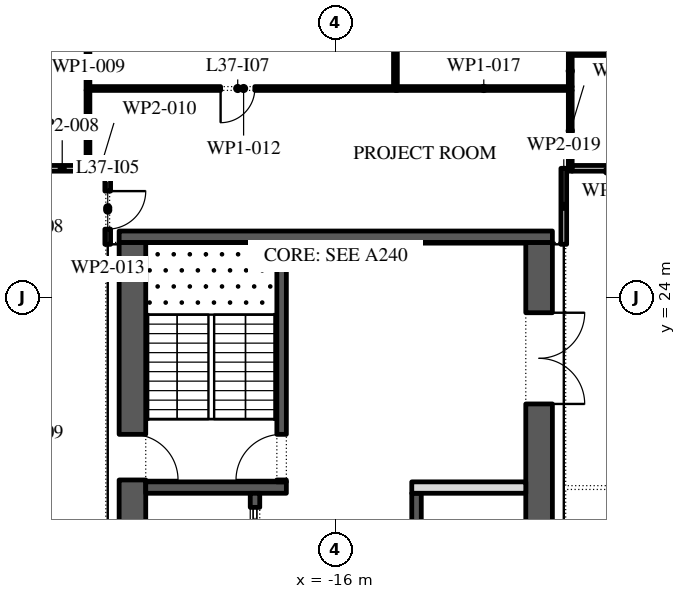
"""IFC4 building model, lengths in metres.
Left out: names, types, materials, properties, quantities, classifications, styles, units other than length and angle.
Written with IfcOpenShell. Run it as: python <this file> out.ifc"""

import sys

from ifc_helpers import new_model, si_unit, direction, frame, frame_2d, origin, place, context, subcontext, project, spatial, rectangle, extrude, element, fill, save


model = new_model("IFC4")
c1 = context("Model", 3, precision=1e-05, world=origin(), true_north=direction((0.0, 1.0)))
c2 = subcontext(c1, "Body", "Model", "MODEL_VIEW")
j1 = project(units=[si_unit("LENGTHUNIT", "METRE"), si_unit("PLANEANGLEUNIT", "RADIAN")], contexts=[c1])
p1 = place(None, origin())
s1 = spatial("IfcSite", under=j1, at=p1, CompositionType="ELEMENT")
p2 = place(p1, origin())
s2 = spatial("IfcBuilding", under=s1, at=p2, CompositionType="ELEMENT")
p3 = place(p2, frame((0.0, 0.0, 171.6)))
s3 = spatial("IfcBuildingStorey", under=s2, at=p3, CompositionType="ELEMENT", Elevation=171.6)
p4 = place(p3, frame((-33.157, 30.092, 0.0), z_axis=(0.0, 0.0, 1.0), x_axis=(0.224950279389, -0.974370243697, 0.0)))
e1 = element("IfcWall", 1, at=p4, inside=s3, PredefinedType="STANDARD", context=c2, shape_type="SweptSolid", body=[
    extrude(rectangle(XDim=49.5, YDim=0.3, at=frame_2d((24.75, 0.0))), origin(), (0.0, 0.0, 1.0), 4.0),
])
p5 = place(p4, frame((2.207, 0.0, 0.0)))
e2 = element("IfcOpeningElement", 2, at=p5, cuts=e1, PredefinedType="OPENING", context=c2, shape_type="SweptSolid", body=[
    extrude(rectangle(XDim=2.4, YDim=3.5, at=frame_2d((1.2, 1.75))), frame((0.0, 0.16, 0.0), z_axis=(0.0, -1.0, 0.0), x_axis=(1.0, 0.0, 0.0)), (0.0, 0.0, 1.0), 0.32),
])
p6 = place(p4, frame((8.121, 0.0, 0.45)))
e3 = element("IfcOpeningElement", 3, at=p6, cuts=e1, PredefinedType="OPENING", context=c2, shape_type="SweptSolid", body=[
    extrude(rectangle(XDim=4.5, YDim=2.825, at=frame_2d((2.25, 1.413))), frame((0.0, 0.16, 0.0), z_axis=(0.0, -1.0, 0.0), x_axis=(1.0, 0.0, 0.0)), (0.0, 0.0, 1.0), 0.32),
])
p7 = place(p4, frame((15.236, 0.0, 0.45)))
e4 = element("IfcOpeningElement", 4, at=p7, cuts=e1, PredefinedType="OPENING", context=c2, shape_type="SweptSolid", body=[
    extrude(rectangle(XDim=4.5, YDim=2.95, at=frame_2d((2.25, 1.475))), frame((0.0, 0.16, 0.0), z_axis=(0.0, -1.0, 0.0), x_axis=(1.0, 0.0, 0.0)), (0.0, 0.0, 1.0), 0.32),
])
p8 = place(p4, frame((22.35, 0.0, 0.45)))
e5 = element("IfcOpeningElement", 5, at=p8, cuts=e1, PredefinedType="OPENING", context=c2, shape_type="SweptSolid", body=[
    extrude(rectangle(XDim=4.5, YDim=3.0, at=frame_2d((2.25, 1.5))), frame((0.0, 0.16, 0.0), z_axis=(0.0, -1.0, 0.0), x_axis=(1.0, 0.0, 0.0)), (0.0, 0.0, 1.0), 0.32),
])
p9 = place(p4, frame((30.514, 0.0, 0.0)))
e6 = element("IfcOpeningElement", 6, at=p9, cuts=e1, PredefinedType="OPENING", context=c2, shape_type="SweptSolid", body=[
    extrude(rectangle(XDim=2.4, YDim=3.5, at=frame_2d((1.2, 1.75))), frame((0.0, 0.16, 0.0), z_axis=(0.0, -1.0, 0.0), x_axis=(1.0, 0.0, 0.0)), (0.0, 0.0, 1.0), 0.32),
])
p10 = place(p4, frame((36.579, 0.0, 0.45)))
e7 = element("IfcOpeningElement", 7, at=p10, cuts=e1, PredefinedType="OPENING", context=c2, shape_type="SweptSolid", body=[
    extrude(rectangle(XDim=4.5, YDim=3.05, at=frame_2d((2.25, 1.525))), frame((0.0, 0.16, 0.0), z_axis=(0.0, -1.0, 0.0), x_axis=(1.0, 0.0, 0.0)), (0.0, 0.0, 1.0), 0.32),
])
p11 = place(p4, frame((43.693, 0.0, 0.45)))
e8 = element("IfcOpeningElement", 8, at=p11, cuts=e1, PredefinedType="OPENING", context=c2, shape_type="SweptSolid", body=[
    extrude(rectangle(XDim=4.5, YDim=3.05, at=frame_2d((2.25, 1.525))), frame((0.0, 0.16, 0.0), z_axis=(0.0, -1.0, 0.0), x_axis=(1.0, 0.0, 0.0)), (0.0, 0.0, 1.0), 0.32),
])
p12 = place(p3, frame((-21.35, -2.45, 0.0), z_axis=(0.0, 0.0, 1.0), x_axis=(0.0, 1.0, 0.0)))
e9 = element("IfcWall", 9, at=p12, inside=s3, PredefinedType="SHEAR", context=c2, shape_type="SweptSolid", body=[
    extrude(rectangle(XDim=27.9, YDim=0.7, at=frame_2d((13.95, 0.0))), origin(), (0.0, 0.0, 1.0), 4.0),
])
p13 = place(p12, frame((5.05, 0.0, 0.0)))
e10 = element("IfcOpeningElement", 10, at=p13, cuts=e9, PredefinedType="OPENING", context=c2, shape_type="SweptSolid", body=[
    extrude(rectangle(XDim=1.2, YDim=2.1, at=frame_2d((0.6, 1.05))), frame((0.0, 0.36, 0.0), z_axis=(0.0, -1.0, 0.0), x_axis=(1.0, 0.0, 0.0)), (0.0, 0.0, 1.0), 0.72),
])
p14 = place(p12, frame((21.65, 0.0, 0.0)))
e11 = element("IfcOpeningElement", 11, at=p14, cuts=e9, PredefinedType="OPENING", context=c2, shape_type="SweptSolid", body=[
    extrude(rectangle(XDim=1.2, YDim=2.1, at=frame_2d((0.6, 1.05))), frame((0.0, 0.36, 0.0), z_axis=(0.0, -1.0, 0.0), x_axis=(1.0, 0.0, 0.0)), (0.0, 0.0, 1.0), 0.72),
])
p15 = place(p3, frame((-10.65, -2.45, 0.0), z_axis=(0.0, 0.0, 1.0), x_axis=(0.0, 1.0, 0.0)))
e12 = element("IfcWall", 12, at=p15, inside=s3, PredefinedType="SHEAR", context=c2, shape_type="SweptSolid", body=[
    extrude(rectangle(XDim=27.9, YDim=0.7, at=frame_2d((13.95, 0.0))), origin(), (0.0, 0.0, 1.0), 4.0),
])
p16 = place(p15, frame((23.65, 0.0, 0.0)))
e13 = element("IfcOpeningElement", 13, at=p16, cuts=e12, PredefinedType="OPENING", context=c2, shape_type="SweptSolid", body=[
    extrude(rectangle(XDim=2.4, YDim=2.1, at=frame_2d((1.2, 1.05))), frame((0.0, 0.36, 0.0), z_axis=(0.0, -1.0, 0.0), x_axis=(1.0, 0.0, 0.0)), (0.0, 0.0, 1.0), 0.72),
])
p17 = place(p15, frame((1.387, 0.0, 0.0)))
e14 = element("IfcOpeningElement", 14, at=p17, cuts=e12, PredefinedType="OPENING", context=c2, shape_type="SweptSolid", body=[
    extrude(rectangle(XDim=0.9, YDim=2.1, at=frame_2d((0.45, 1.05))), frame((0.0, 0.36, 0.0), z_axis=(0.0, -1.0, 0.0), x_axis=(1.0, 0.0, 0.0)), (0.0, 0.0, 1.0), 0.72),
])
p18 = place(p15, frame((4.562, 0.0, 0.0)))
e15 = element("IfcOpeningElement", 15, at=p18, cuts=e12, PredefinedType="OPENING", context=c2, shape_type="SweptSolid", body=[
    extrude(rectangle(XDim=1.0, YDim=2.1, at=frame_2d((0.5, 1.05))), frame((0.0, 0.36, 0.0), z_axis=(0.0, -1.0, 0.0), x_axis=(1.0, 0.0, 0.0)), (0.0, 0.0, 1.0), 0.72),
])
p19 = place(p3, frame((-21.7, 25.6, 0.0), z_axis=(0.0, 0.0, 1.0), x_axis=(1.0, 0.0, 0.0)))
e16 = element("IfcWall", 16, at=p19, inside=s3, PredefinedType="SHEAR", context=c2, shape_type="SweptSolid", body=[
    extrude(rectangle(XDim=11.4, YDim=0.3, at=frame_2d((5.7, 0.0))), origin(), (0.0, 0.0, 1.0), 4.0),
])
p20 = place(p3, frame((-21.0, 19.0, 0.0), z_axis=(0.0, 0.0, 1.0), x_axis=(1.0, 0.0, 0.0)))
e17 = element("IfcWall", 17, at=p20, inside=s3, PredefinedType="SHEAR", context=c2, shape_type="SweptSolid", body=[
    extrude(rectangle(XDim=3.7, YDim=0.3, at=frame_2d((1.85, 0.0))), origin(), (0.0, 0.0, 1.0), 4.0),
])
p21 = place(p3, frame((-17.425, 19.15, 0.0), z_axis=(0.0, 0.0, 1.0), x_axis=(0.0, 1.0, 0.0)))
e18 = element("IfcWall", 18, at=p21, inside=s3, PredefinedType="SHEAR", context=c2, shape_type="SweptSolid", body=[
    extrude(rectangle(XDim=6.3, YDim=0.25, at=frame_2d((3.15, 0.0))), origin(), (0.0, 0.0, 1.0), 4.0),
])
p22 = place(p21, frame((0.05, 0.0, 0.0)))
e19 = element("IfcOpeningElement", 19, at=p22, cuts=e18, PredefinedType="OPENING", context=c2, shape_type="SweptSolid", body=[
    extrude(rectangle(XDim=1.2, YDim=2.1, at=frame_2d((0.6, 1.05))), frame((0.0, 0.135, 0.0), z_axis=(0.0, -1.0, 0.0), x_axis=(1.0, 0.0, 0.0)), (0.0, 0.0, 1.0), 0.27),
])
p23 = place(p3, frame((-18.125, 4.15, 0.0), z_axis=(0.0, 0.0, 1.0), x_axis=(0.0, 1.0, 0.0)))
e20 = element("IfcWall", 20, at=p23, inside=s3, PredefinedType="SHEAR", context=c2, shape_type="SweptSolid", body=[
    extrude(rectangle(XDim=14.7, YDim=0.25, at=frame_2d((7.35, 0.0))), origin(), (0.0, 0.0, 1.0), 4.0),
])
p24 = place(p23, frame((3.096, 0.0, 0.0)))
e21 = element("IfcOpeningElement", 21, at=p24, cuts=e20, PredefinedType="OPENING", context=c2, shape_type="SweptSolid", body=[
    extrude(rectangle(XDim=0.9, YDim=2.1, at=frame_2d((0.45, 1.05))), frame((0.0, 0.135, 0.0), z_axis=(0.0, -1.0, 0.0), x_axis=(1.0, 0.0, 0.0)), (0.0, 0.0, 1.0), 0.27),
])
p25 = place(p23, frame((5.85, 0.0, 0.0)))
e22 = element("IfcOpeningElement", 22, at=p25, cuts=e20, PredefinedType="OPENING", context=c2, shape_type="SweptSolid", body=[
    extrude(rectangle(XDim=0.9, YDim=2.1, at=frame_2d((0.45, 1.05))), frame((0.0, 0.135, 0.0), z_axis=(0.0, -1.0, 0.0), x_axis=(1.0, 0.0, 0.0)), (0.0, 0.0, 1.0), 0.27),
])
p26 = place(p23, frame((8.582, 0.0, 0.0)))
e23 = element("IfcOpeningElement", 23, at=p26, cuts=e20, PredefinedType="OPENING", context=c2, shape_type="SweptSolid", body=[
    extrude(rectangle(XDim=0.9, YDim=2.1, at=frame_2d((0.45, 1.05))), frame((0.0, 0.135, 0.0), z_axis=(0.0, -1.0, 0.0), x_axis=(1.0, 0.0, 0.0)), (0.0, 0.0, 1.0), 0.27),
])
p27 = place(p23, frame((0.371, 0.0, 0.0)))
e24 = element("IfcOpeningElement", 24, at=p27, cuts=e20, PredefinedType="OPENING", context=c2, shape_type="SweptSolid", body=[
    extrude(rectangle(XDim=1.1, YDim=2.1, at=frame_2d((0.55, 1.05))), frame((0.0, 0.135, 0.0), z_axis=(0.0, -1.0, 0.0), x_axis=(1.0, 0.0, 0.0)), (0.0, 0.0, 1.0), 0.27),
])
p28 = place(p23, frame((13.229, 0.0, 0.0)))
e25 = element("IfcOpeningElement", 25, at=p28, cuts=e20, PredefinedType="OPENING", context=c2, shape_type="SweptSolid", body=[
    extrude(rectangle(XDim=1.1, YDim=2.1, at=frame_2d((0.55, 1.05))), frame((0.0, 0.135, 0.0), z_axis=(0.0, -1.0, 0.0), x_axis=(1.0, 0.0, 0.0)), (0.0, 0.0, 1.0), 0.27),
])
p29 = place(p3, frame((-13.875, -2.45, 0.0), z_axis=(0.0, 0.0, 1.0), x_axis=(0.0, 1.0, 0.0)))
e26 = element("IfcWall", 26, at=p29, inside=s3, PredefinedType="SHEAR", context=c2, shape_type="SweptSolid", body=[
    extrude(rectangle(XDim=21.3, YDim=0.25, at=frame_2d((10.65, 0.0))), origin(), (0.0, 0.0, 1.0), 4.0),
])
p30 = place(p29, frame((17.786, 0.0, 0.0)))
e27 = element("IfcOpeningElement", 27, at=p30, cuts=e26, PredefinedType="OPENING", context=c2, shape_type="SweptSolid", body=[
    extrude(rectangle(XDim=0.9, YDim=2.1, at=frame_2d((0.45, 1.05))), frame((0.0, 0.135, 0.0), z_axis=(0.0, -1.0, 0.0), x_axis=(1.0, 0.0, 0.0)), (0.0, 0.0, 1.0), 0.27),
])
p31 = place(p29, frame((6.971, 0.0, 0.0)))
e28 = element("IfcOpeningElement", 28, at=p31, cuts=e26, PredefinedType="OPENING", context=c2, shape_type="SweptSolid", body=[
    extrude(rectangle(XDim=1.1, YDim=2.1, at=frame_2d((0.55, 1.05))), frame((0.0, 0.135, 0.0), z_axis=(0.0, -1.0, 0.0), x_axis=(1.0, 0.0, 0.0)), (0.0, 0.0, 1.0), 0.27),
])
p32 = place(p29, frame((9.114, 0.0, 0.0)))
e29 = element("IfcOpeningElement", 29, at=p32, cuts=e26, PredefinedType="OPENING", context=c2, shape_type="SweptSolid", body=[
    extrude(rectangle(XDim=1.1, YDim=2.1, at=frame_2d((0.55, 1.05))), frame((0.0, 0.135, 0.0), z_axis=(0.0, -1.0, 0.0), x_axis=(1.0, 0.0, 0.0)), (0.0, 0.0, 1.0), 0.27),
])
p33 = place(p29, frame((11.257, 0.0, 0.0)))
e30 = element("IfcOpeningElement", 30, at=p33, cuts=e26, PredefinedType="OPENING", context=c2, shape_type="SweptSolid", body=[
    extrude(rectangle(XDim=1.1, YDim=2.1, at=frame_2d((0.55, 1.05))), frame((0.0, 0.135, 0.0), z_axis=(0.0, -1.0, 0.0), x_axis=(1.0, 0.0, 0.0)), (0.0, 0.0, 1.0), 0.27),
])
p34 = place(p29, frame((13.4, 0.0, 0.0)))
e31 = element("IfcOpeningElement", 31, at=p34, cuts=e26, PredefinedType="OPENING", context=c2, shape_type="SweptSolid", body=[
    extrude(rectangle(XDim=1.1, YDim=2.1, at=frame_2d((0.55, 1.05))), frame((0.0, 0.135, 0.0), z_axis=(0.0, -1.0, 0.0), x_axis=(1.0, 0.0, 0.0)), (0.0, 0.0, 1.0), 0.27),
])
p35 = place(p3, frame((-14.0, 19.0, 0.0), z_axis=(0.0, 0.0, 1.0), x_axis=(1.0, 0.0, 0.0)))
e32 = element("IfcWall", 32, at=p35, inside=s3, PredefinedType="PARTITIONING", context=c2, shape_type="SweptSolid", body=[
    extrude(rectangle(XDim=3.0, YDim=0.3, at=frame_2d((1.5, 0.0))), origin(), (0.0, 0.0, 1.0), 4.0),
])
p36 = place(p3, frame((-23.925, 27.4, 0.0), z_axis=(0.0, 0.0, 1.0), x_axis=(1.0, 0.0, 0.0)))
e33 = element("IfcWall", 33, at=p36, inside=s3, PredefinedType="PARTITIONING", context=c2, shape_type="SweptSolid", body=[
    extrude(rectangle(XDim=1.455, YDim=0.15, at=frame_2d((0.728, 0.0))), origin(), (0.0, 0.0, 1.0), 4.0),
])
p37 = place(p3, frame((-22.52, 27.475, 0.0), z_axis=(0.0, 0.0, 1.0), x_axis=(0.0, 1.0, 0.0)))
e34 = element("IfcWall", 34, at=p37, inside=s3, PredefinedType="PARTITIONING", context=c2, shape_type="SweptSolid", body=[
    extrude(rectangle(XDim=1.975, YDim=0.1, at=frame_2d((0.987, 0.0))), origin(), (0.0, 0.0, 1.0), 4.0),
])
p38 = place(p3, frame((-22.47, 27.4, 0.0), z_axis=(0.0, 0.0, 1.0), x_axis=(1.0, 0.0, 0.0)))
e35 = element("IfcWall", 35, at=p38, inside=s3, PredefinedType="PARTITIONING", context=c2, shape_type="SweptSolid", body=[
    extrude(rectangle(XDim=0.545, YDim=0.15, at=frame_2d((0.272, 0.0))), origin(), (0.0, 0.0, 1.0), 4.0),
])
p39 = place(p3, frame((-22.52, 29.45, 0.0), z_axis=(0.0, 0.0, 1.0), x_axis=(0.0, 1.0, 0.0)))
e36 = element("IfcWall", 36, at=p39, inside=s3, PredefinedType="PARTITIONING", context=c2, shape_type="SweptSolid", body=[
    extrude(rectangle(XDim=6.875, YDim=0.1, at=frame_2d((3.438, 0.0))), origin(), (0.0, 0.0, 1.0), 4.0),
])
p40 = place(p3, frame((-22.47, 29.5, 0.0), z_axis=(0.0, 0.0, 1.0), x_axis=(1.0, 0.0, 0.0)))
e37 = element("IfcWall", 37, at=p40, inside=s3, PredefinedType="PARTITIONING", context=c2, shape_type="SweptSolid", body=[
    extrude(rectangle(XDim=8.09, YDim=0.1, at=frame_2d((4.045, 0.0))), origin(), (0.0, 0.0, 1.0), 4.0),
])
p41 = place(p40, frame((3.44, 0.0, 0.0)))
e38 = element("IfcOpeningElement", 38, at=p41, cuts=e37, PredefinedType="OPENING", context=c2, shape_type="SweptSolid", body=[
    extrude(rectangle(XDim=0.9, YDim=2.1, at=frame_2d((0.45, 1.05))), frame((0.0, 0.06, 0.0), z_axis=(0.0, -1.0, 0.0), x_axis=(1.0, 0.0, 0.0)), (0.0, 0.0, 1.0), 0.12),
])
p42 = place(p3, frame((-22.0, 27.325, 0.0), z_axis=(0.0, 0.0, 1.0), x_axis=(0.0, -1.0, 0.0)))
e39 = element("IfcWall", 39, at=p42, inside=s3, PredefinedType="PARTITIONING", context=c2, shape_type="SweptSolid", body=[
    extrude(rectangle(XDim=1.925, YDim=0.15, at=frame_2d((0.962, 0.0))), origin(), (0.0, 0.0, 1.0), 4.0),
])
p43 = place(p42, frame((0.525, 0.0, 0.0)))
e40 = element("IfcOpeningElement", 40, at=p43, cuts=e39, PredefinedType="OPENING", context=c2, shape_type="SweptSolid", body=[
    extrude(rectangle(XDim=1.0, YDim=2.1, at=frame_2d((0.5, 1.05))), frame((0.0, 0.085, 0.0), z_axis=(0.0, -1.0, 0.0), x_axis=(1.0, 0.0, 0.0)), (0.0, 0.0, 1.0), 0.17),
])
p44 = place(p3, frame((-14.43, 29.55, 0.0), z_axis=(0.0, 0.0, 1.0), x_axis=(0.0, 1.0, 0.0)))
e41 = element("IfcWall", 41, at=p44, inside=s3, PredefinedType="PARTITIONING", context=c2, shape_type="SweptSolid", body=[
    extrude(rectangle(XDim=8.643, YDim=0.1, at=frame_2d((4.322, 0.0))), origin(), (0.0, 0.0, 1.0), 4.0),
])
p45 = place(p3, frame((-14.43, 29.5, 0.0), z_axis=(0.0, 0.0, 1.0), x_axis=(1.0, 0.0, 0.0)))
e42 = element("IfcWall", 42, at=p45, inside=s3, PredefinedType="PARTITIONING", context=c2, shape_type="SweptSolid", body=[
    extrude(rectangle(XDim=4.65, YDim=0.1, at=frame_2d((2.325, 0.0))), origin(), (0.0, 0.0, 1.0), 4.0),
])
p46 = place(p3, frame((-10.0, 25.4, 0.0), z_axis=(0.0, 0.0, 1.0), x_axis=(0.0, 1.0, 0.0)))
e43 = element("IfcWall", 43, at=p46, inside=s3, PredefinedType="PARTITIONING", context=c2, shape_type="SweptSolid", body=[
    extrude(rectangle(XDim=2.0, YDim=0.15, at=frame_2d((1.0, 0.0))), origin(), (0.0, 0.0, 1.0), 4.0),
])
p47 = place(p3, frame((-9.83, 27.325, 0.0), z_axis=(0.0, 0.0, 1.0), x_axis=(0.0, 1.0, 0.0)))
e44 = element("IfcWall", 44, at=p47, inside=s3, PredefinedType="PARTITIONING", context=c2, shape_type="SweptSolid", body=[
    extrude(rectangle(XDim=2.125, YDim=0.1, at=frame_2d((1.062, 0.0))), origin(), (0.0, 0.0, 1.0), 4.0),
])
p48 = place(p3, frame((-9.78, 27.4, 0.0), z_axis=(0.0, 0.0, 1.0), x_axis=(1.0, 0.0, 0.0)))
e45 = element("IfcWall", 45, at=p48, inside=s3, PredefinedType="PARTITIONING", context=c2, shape_type="SweptSolid", body=[
    extrude(rectangle(XDim=1.855, YDim=0.15, at=frame_2d((0.927, 0.0))), origin(), (0.0, 0.0, 1.0), 4.0),
])
p49 = place(p3, frame((-9.83, 29.55, 0.0), z_axis=(0.0, 0.0, 1.0), x_axis=(0.0, 1.0, 0.0)))
e46 = element("IfcWall", 46, at=p49, inside=s3, PredefinedType="PARTITIONING", context=c2, shape_type="SweptSolid", body=[
    extrude(rectangle(XDim=0.82, YDim=0.1, at=frame_2d((0.41, 0.0))), origin(), (0.0, 0.0, 1.0), 4.0),
])
p50 = place(p3, frame((-9.83, 30.37, 0.0), z_axis=(0.0, 0.0, 1.0), x_axis=(0.0, 1.0, 0.0)))
e47 = element("IfcWall", 47, at=p50, inside=s3, PredefinedType="PARTITIONING", context=c2, shape_type="SweptSolid", body=[
    extrude(rectangle(XDim=8.885, YDim=0.1, at=frame_2d((4.442, 0.0))), origin(), (0.0, 0.0, 1.0), 4.0),
])
p51 = place(p50, frame((2.26, 0.0, 0.0)))
e48 = element("IfcOpeningElement", 48, at=p51, cuts=e47, PredefinedType="OPENING", context=c2, shape_type="SweptSolid", body=[
    extrude(rectangle(XDim=0.9, YDim=2.1, at=frame_2d((0.45, 1.05))), frame((0.0, 0.06, 0.0), z_axis=(0.0, -1.0, 0.0), x_axis=(1.0, 0.0, 0.0)), (0.0, 0.0, 1.0), 0.12),
])
p52 = place(p3, frame((-9.78, 30.42, 0.0), z_axis=(0.0, 0.0, 1.0), x_axis=(1.0, 0.0, 0.0)))
e49 = element("IfcWall", 49, at=p52, inside=s3, PredefinedType="PARTITIONING", context=c2, shape_type="SweptSolid", body=[
    extrude(rectangle(XDim=8.755, YDim=0.1, at=frame_2d((4.377, 0.0))), origin(), (0.0, 0.0, 1.0), 4.0),
])
p53 = place(p28, origin())
e50 = element("IfcDoor", 50, at=p53, inside=s3, OperationType="SLIDING_TO_LEFT", PredefinedType="DOOR", context=c2, shape_type="SweptSolid", body=[
    extrude(rectangle(XDim=1.1, YDim=2.1, at=frame_2d((0.55, 1.05))), frame((0.0, 0.025, 0.0), z_axis=(0.0, -1.0, 0.0), x_axis=(1.0, 0.0, 0.0)), (0.0, 0.0, 1.0), 0.05),
])
fill(e25, e50)
p54 = place(p16, frame((2.4, 0.0, 0.0), z_axis=(0.0, 0.0, 1.0), x_axis=(-1.0, 0.0, 0.0)))
e51 = element("IfcDoor", 51, at=p54, inside=s3, OperationType="DOUBLE_DOOR_SINGLE_SWING", PredefinedType="DOOR", context=c2, shape_type="SweptSolid", body=[
    extrude(rectangle(XDim=2.4, YDim=2.1, at=frame_2d((1.2, 1.05))), frame((0.0, 0.025, 0.0), z_axis=(0.0, -1.0, 0.0), x_axis=(1.0, 0.0, 0.0)), (0.0, 0.0, 1.0), 0.05),
])
fill(e13, e51)
p55 = place(p22, origin())
e52 = element("IfcDoor", 52, at=p55, inside=s3, OperationType="SINGLE_SWING_RIGHT", PredefinedType="DOOR", context=c2, shape_type="SweptSolid", body=[
    extrude(rectangle(XDim=1.2, YDim=2.1, at=frame_2d((0.6, 1.05))), frame((0.0, 0.025, 0.0), z_axis=(0.0, -1.0, 0.0), x_axis=(1.0, 0.0, 0.0)), (0.0, 0.0, 1.0), 0.05),
])
fill(e19, e52)
p56 = place(p14, frame((1.2, 0.0, 0.0), z_axis=(0.0, 0.0, 1.0), x_axis=(-1.0, 0.0, 0.0)))
e53 = element("IfcDoor", 53, at=p56, inside=s3, OperationType="SINGLE_SWING_LEFT", PredefinedType="DOOR", context=c2, shape_type="SweptSolid", body=[
    extrude(rectangle(XDim=1.2, YDim=2.1, at=frame_2d((0.6, 1.05))), frame((0.0, 0.025, 0.0), z_axis=(0.0, -1.0, 0.0), x_axis=(1.0, 0.0, 0.0)), (0.0, 0.0, 1.0), 0.05),
])
fill(e11, e53)
p57 = place(p43, origin())
e54 = element("IfcDoor", 54, at=p57, inside=s3, OperationType="SINGLE_SWING_RIGHT", PredefinedType="DOOR", context=c2, shape_type="SweptSolid", body=[
    extrude(rectangle(XDim=1.0, YDim=2.1, at=frame_2d((0.5, 1.05))), frame((0.0, 0.025, 0.0), z_axis=(0.0, -1.0, 0.0), x_axis=(1.0, 0.0, 0.0)), (0.0, 0.0, 1.0), 0.05),
])
fill(e40, e54)
p58 = place(p41, frame((0.9, 0.0, 0.0), z_axis=(0.0, 0.0, 1.0), x_axis=(-1.0, 0.0, 0.0)))
e55 = element("IfcDoor", 55, at=p58, inside=s3, OperationType="SINGLE_SWING_LEFT", PredefinedType="DOOR", context=c2, shape_type="SweptSolid", body=[
    extrude(rectangle(XDim=0.9, YDim=2.1, at=frame_2d((0.45, 1.05))), frame((0.0, 0.025, 0.0), z_axis=(0.0, -1.0, 0.0), x_axis=(1.0, 0.0, 0.0)), (0.0, 0.0, 1.0), 0.05),
])
fill(e38, e55)
save(model, sys.argv[1])
